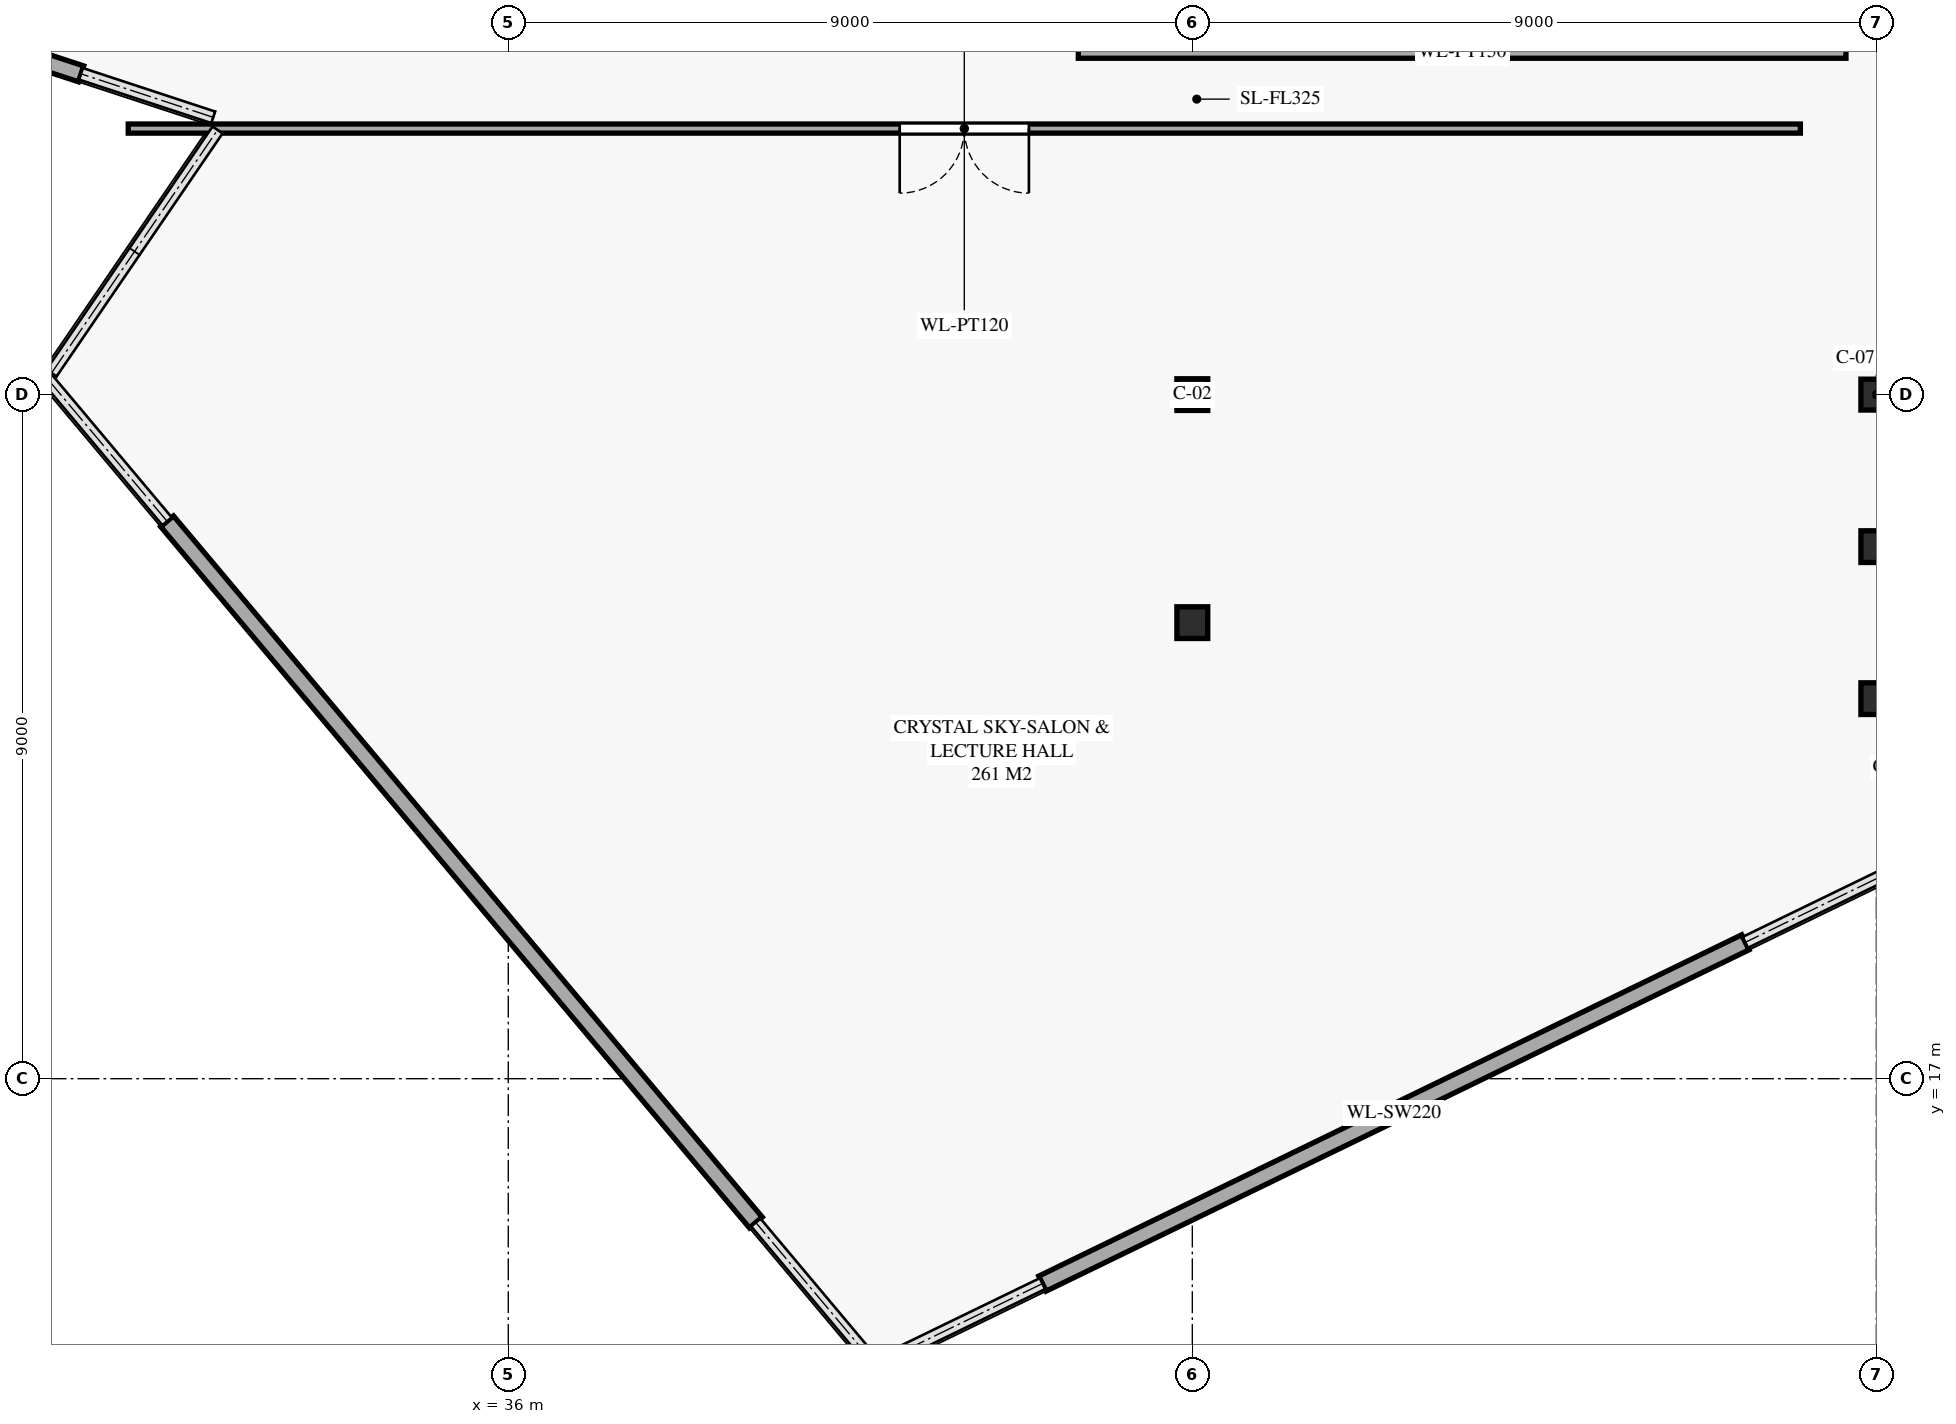
"""IFC4 building model, lengths in metres.
Left out: names, types, materials, properties, quantities, classifications, styles, units other than length and angle.
Written with IfcOpenShell. Run it as: python <this file> out.ifc"""

import sys

from ifc_helpers import new_model, si_unit, direction, frame, frame_2d, origin, origin_2d, place, context, subcontext, project, spatial, rectangle, hollow_rectangle, i_section, extrude, element, fill, save


model = new_model("IFC4")
c1 = context("Model", 3, precision=1e-05, world=origin(), true_north=direction((0.0, 1.0)))
c2 = subcontext(c1, "Body", "Model", "MODEL_VIEW")
j1 = project(units=[si_unit("LENGTHUNIT", "METRE"), si_unit("PLANEANGLEUNIT", "RADIAN")], contexts=[c1])
p1 = place(None, origin())
s1 = spatial("IfcSite", under=j1, at=p1, CompositionType="ELEMENT")
p2 = place(p1, origin())
s2 = spatial("IfcBuilding", under=s1, at=p2, CompositionType="ELEMENT")
p3 = place(p2, frame((0.0, 0.0, 15.0)))
s3 = spatial("IfcBuildingStorey", under=s2, at=p3, CompositionType="ELEMENT", Elevation=15.0)
p4 = place(p3, frame((45.0, 26.0, 0.0), z_axis=(0.0, 0.0, 1.0), x_axis=(1.0, 0.0, 0.0)))
e1 = element("IfcColumn", 1, at=p4, inside=s3, PredefinedType="COLUMN", context=c2, shape_type="SweptSolid", body=[
    extrude(i_section(OverallWidth=0.406, OverallDepth=0.417, WebThickness=0.03, FlangeThickness=0.048, FilletRadius=0.018, at=origin_2d()), origin(), (0.0, 0.0, 1.0), 5.0),
])
p5 = place(p3, frame((54.0, 26.0, 0.0), z_axis=(0.0, 0.0, 1.0), x_axis=(1.0, 0.0, 0.0)))
e2 = element("IfcColumn", 2, at=p5, inside=s3, PredefinedType="COLUMN", context=c2, shape_type="SweptSolid", body=[
    extrude(hollow_rectangle(XDim=0.406, YDim=0.406, WallThickness=0.015, InnerFilletRadius=0.015, OuterFilletRadius=0.03, at=origin_2d()), origin(), (0.0, 0.0, 1.0), 5.0),
])
for number, where, z_axis, x_axis in (
    (3, (45.0, 23.0, -0.871), (0.0, 0.0, 1.0), (1.0, 0.0, 0.0)),
    (4, (54.0, 22.0, -0.871), (0.0, 0.0, 1.0), (1.0, 0.0, 0.0)),
    (5, (54.0, 24.0, -0.871), (0.0, 0.0, 1.0), (1.0, 0.0, 0.0)),
):
    element("IfcColumn", number, at=place(p3, frame(where, z_axis=z_axis, x_axis=x_axis)), inside=s3, PredefinedType="COLUMN", context=c2, shape_type="SweptSolid", body=[
        extrude(i_section(OverallWidth=0.406, OverallDepth=0.417, WebThickness=0.03, FlangeThickness=0.048, FilletRadius=0.018, at=origin_2d()), origin(), (0.0, 0.0, 1.0), 5.025),
    ])
p6 = place(p3, frame((52.276, 18.794, 0.0), z_axis=(0.0, 0.0, 1.0), x_axis=(-0.899586006578, -0.436743651091, 0.0)))
e6 = element("IfcWall", 6, at=p6, inside=s3, PredefinedType="SOLIDWALL", context=c2, shape_type="SweptSolid", body=[
    extrude(rectangle(XDim=10.281, YDim=0.22, at=frame_2d((5.14, 0.0))), origin(), (0.0, 0.0, 1.0), 4.7),
])
p7 = place(p3, frame((39.257, 15.108, 0.0), z_axis=(0.0, 0.0, 1.0), x_axis=(-0.643046628077, 0.765827026239, 0.0)))
e7 = element("IfcWall", 7, at=p7, inside=s3, PredefinedType="SOLIDWALL", context=c2, shape_type="SweptSolid", body=[
    extrude(rectangle(XDim=12.046, YDim=0.22, at=frame_2d((6.023, 0.0))), origin(), (0.0, 0.0, 1.0), 4.72),
])
p8 = place(p3, frame((30.379, 30.22, 0.0), z_axis=(0.0, 0.0, 1.0), x_axis=(-0.95003900153, 0.312131215311, 0.0)))
e8 = element("IfcWall", 8, at=p8, inside=s3, PredefinedType="SOLIDWALL", context=c2, shape_type="SweptSolid", body=[
    extrude(rectangle(XDim=4.849, YDim=0.22, at=frame_2d((2.424, 0.0))), origin(), (0.0, 0.0, 1.0), 4.72),
])
p9 = place(p3, frame((53.0, 29.5, 0.0), z_axis=(0.0, 0.0, 1.0), x_axis=(-1.0, 0.0, 0.0)))
e9 = element("IfcWall", 9, at=p9, inside=s3, PredefinedType="PARTITIONING", context=c2, shape_type="SweptSolid", body=[
    extrude(rectangle(XDim=22.0, YDim=0.12, at=frame_2d((11.0, 0.0))), origin(), (0.0, 0.0, 1.0), 4.7),
])
p10 = place(p9, frame((10.15, 0.0, 0.0)))
e10 = element("IfcOpeningElement", 10, at=p10, cuts=e9, PredefinedType="OPENING", context=c2, shape_type="SweptSolid", body=[
    extrude(rectangle(XDim=1.7, YDim=2.2, at=frame_2d((0.85, 1.1))), frame((0.0, 0.07, 0.0), z_axis=(0.0, -1.0, 0.0), x_axis=(1.0, 0.0, 0.0)), (0.0, 0.0, 1.0), 0.14),
])
p11 = place(p3, frame((43.5, 30.5, 0.0), z_axis=(0.0, 0.0, 1.0), x_axis=(1.0, 0.0, 0.0)))
e11 = element("IfcWall", 11, at=p11, inside=s3, PredefinedType="PARTITIONING", context=c2, shape_type="SweptSolid", body=[
    extrude(rectangle(XDim=10.1, YDim=0.15, at=frame_2d((5.05, 0.0))), origin(), (0.0, 0.0, 1.0), 4.7),
])
p12 = place(p10, origin())
e12 = element("IfcDoor", 12, at=p12, inside=s3, OperationType="DOUBLE_DOOR_SINGLE_SWING", PredefinedType="DOOR", context=c2, shape_type="SweptSolid", body=[
    extrude(rectangle(XDim=1.7, YDim=2.2, at=frame_2d((0.85, 1.1))), frame((0.0, 0.025, 0.0), z_axis=(0.0, -1.0, 0.0), x_axis=(1.0, 0.0, 0.0)), (0.0, 0.0, 1.0), 0.05),
])
fill(e10, e12)
save(model, sys.argv[1])
